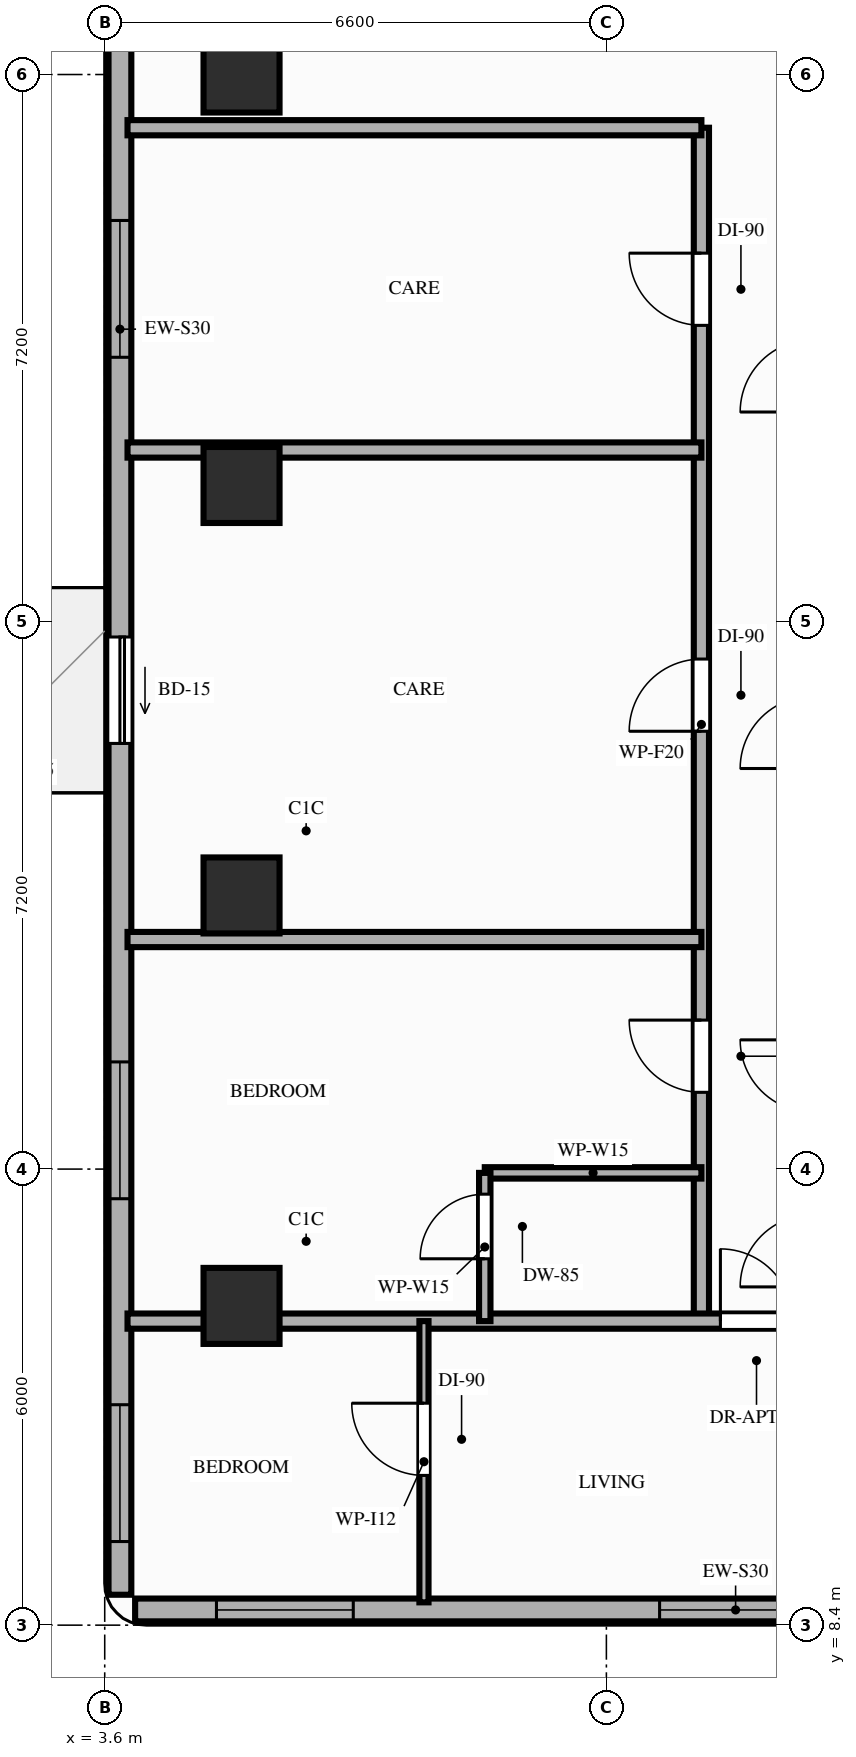
"""IFC4 building model, lengths in metres.
Left out: names, types, materials, properties, quantities, classifications, styles, units other than length and angle.
Written with IfcOpenShell. Run it as: python <this file> out.ifc"""

import sys

from ifc_helpers import new_model, si_unit, direction, frame, frame_2d, origin, origin_2d, place, context, subcontext, project, spatial, rectangle, extrude, element, fill, save


model = new_model("IFC4")
c1 = context("Model", 3, precision=1e-05, world=origin(), true_north=direction((0.0, 1.0)))
c2 = subcontext(c1, "Body", "Model", "MODEL_VIEW")
j1 = project(units=[si_unit("LENGTHUNIT", "METRE"), si_unit("PLANEANGLEUNIT", "RADIAN")], contexts=[c1])
p1 = place(None, origin())
s1 = spatial("IfcSite", under=j1, at=p1, CompositionType="ELEMENT")
p2 = place(p1, origin())
s2 = spatial("IfcBuilding", under=s1, at=p2, CompositionType="ELEMENT")
p3 = place(p2, frame((0.0, 0.0, 133.0)))
s3 = spatial("IfcBuildingStorey", under=s2, at=p3, CompositionType="ELEMENT", Elevation=133.0)
for number, where, z_axis, x_axis in (
    (1, (5.4, 12.6, 0.0), (0.0, 0.0, 1.0), (1.0, 0.0, 0.0)),
    (2, (5.4, 18.0, 0.0), (0.0, 0.0, 1.0), (1.0, 0.0, 0.0)),
    (3, (5.4, 23.4, 0.0), (0.0, 0.0, 1.0), (1.0, 0.0, 0.0)),
    (4, (5.4, 28.8, 0.0), (0.0, 0.0, 1.0), (1.0, 0.0, 0.0)),
):
    element("IfcColumn", number, at=place(p3, frame(where, z_axis=z_axis, x_axis=x_axis)), inside=s3, PredefinedType="COLUMN", context=c2, shape_type="SweptSolid", body=[
        extrude(rectangle(XDim=1.0, YDim=1.0, at=origin_2d()), origin(), (0.0, 0.0, 1.0), 3.2),
    ])
p4 = place(p3, frame((4.0, 8.6, 0.0), z_axis=(0.0, 0.0, 1.0), x_axis=(1.0, 0.0, 0.0)))
e5 = element("IfcWall", 5, at=p4, inside=s3, PredefinedType="STANDARD", context=c2, shape_type="SweptSolid", body=[
    extrude(rectangle(XDim=15.8, YDim=0.3, at=frame_2d((7.9, 0.0))), origin(), (0.0, 0.0, 1.0), 3.02),
])
p5 = place(p4, frame((1.07, 0.0, 0.85)))
e6 = element("IfcOpeningElement", 6, at=p5, cuts=e5, PredefinedType="OPENING", context=c2, shape_type="SweptSolid", body=[
    extrude(rectangle(XDim=1.8, YDim=1.75, at=frame_2d((0.9, 0.875))), frame((0.0, 0.16, 0.0), z_axis=(0.0, -1.0, 0.0), x_axis=(1.0, 0.0, 0.0)), (0.0, 0.0, 1.0), 0.32),
])
p6 = place(p4, frame((6.9, 0.0, 0.85)))
e7 = element("IfcOpeningElement", 7, at=p6, cuts=e5, PredefinedType="OPENING", context=c2, shape_type="SweptSolid", body=[
    extrude(rectangle(XDim=1.8, YDim=1.75, at=frame_2d((0.9, 0.875))), frame((0.0, 0.16, 0.0), z_axis=(0.0, -1.0, 0.0), x_axis=(1.0, 0.0, 0.0)), (0.0, 0.0, 1.0), 0.32),
])
p7 = place(p3, frame((3.8, 42.1, 0.0), z_axis=(0.0, 0.0, 1.0), x_axis=(0.0, -1.0, 0.0)))
e8 = element("IfcWall", 8, at=p7, inside=s3, PredefinedType="STANDARD", context=c2, shape_type="SweptSolid", body=[
    extrude(rectangle(XDim=33.3, YDim=0.3, at=frame_2d((16.65, 0.0))), origin(), (0.0, 0.0, 1.0), 2.71),
])
p8 = place(p7, frame((20.7, 0.0, 0.0)))
e9 = element("IfcOpeningElement", 9, at=p8, cuts=e8, PredefinedType="OPENING", context=c2, shape_type="SweptSolid", body=[
    extrude(rectangle(XDim=1.4, YDim=2.1, at=frame_2d((0.7, 1.05))), frame((0.0, 0.16, 0.0), z_axis=(0.0, -1.0, 0.0), x_axis=(1.0, 0.0, 0.0)), (0.0, 0.0, 1.0), 0.32),
])
p9 = place(p7, frame((26.29, 0.0, 0.85)))
e10 = element("IfcOpeningElement", 10, at=p9, cuts=e8, PredefinedType="OPENING", context=c2, shape_type="SweptSolid", body=[
    extrude(rectangle(XDim=1.8, YDim=1.61, at=frame_2d((0.9, 0.805))), frame((0.0, 0.16, 0.0), z_axis=(0.0, -1.0, 0.0), x_axis=(1.0, 0.0, 0.0)), (0.0, 0.0, 1.0), 0.32),
])
p10 = place(p7, frame((15.22, 0.0, 0.85)))
e11 = element("IfcOpeningElement", 11, at=p10, cuts=e8, PredefinedType="OPENING", context=c2, shape_type="SweptSolid", body=[
    extrude(rectangle(XDim=1.8, YDim=1.61, at=frame_2d((0.9, 0.805))), frame((0.0, 0.16, 0.0), z_axis=(0.0, -1.0, 0.0), x_axis=(1.0, 0.0, 0.0)), (0.0, 0.0, 1.0), 0.32),
])
p11 = place(p7, frame((30.8, 0.0, 0.85)))
e12 = element("IfcOpeningElement", 12, at=p11, cuts=e8, PredefinedType="OPENING", context=c2, shape_type="SweptSolid", body=[
    extrude(rectangle(XDim=1.8, YDim=1.61, at=frame_2d((0.9, 0.805))), frame((0.0, 0.16, 0.0), z_axis=(0.0, -1.0, 0.0), x_axis=(1.0, 0.0, 0.0)), (0.0, 0.0, 1.0), 0.32),
])
p12 = place(p7, frame((9.9, 0.0, 0.85)))
e13 = element("IfcOpeningElement", 13, at=p12, cuts=e8, PredefinedType="OPENING", context=c2, shape_type="SweptSolid", body=[
    extrude(rectangle(XDim=1.8, YDim=1.61, at=frame_2d((0.9, 0.805))), frame((0.0, 0.16, 0.0), z_axis=(0.0, -1.0, 0.0), x_axis=(1.0, 0.0, 0.0)), (0.0, 0.0, 1.0), 0.32),
])
p13 = place(p7, frame((3.8, 0.0, 0.85)))
e14 = element("IfcOpeningElement", 14, at=p13, cuts=e8, PredefinedType="OPENING", context=c2, shape_type="SweptSolid", body=[
    extrude(rectangle(XDim=1.8, YDim=1.61, at=frame_2d((0.9, 0.805))), frame((0.0, 0.16, 0.0), z_axis=(0.0, -1.0, 0.0), x_axis=(1.0, 0.0, 0.0)), (0.0, 0.0, 1.0), 0.32),
])
p14 = place(p3, frame((11.45, 12.4, 0.0), z_axis=(0.0, 0.0, 1.0), x_axis=(0.0, 1.0, 0.0)))
e15 = element("IfcWall", 15, at=p14, inside=s3, PredefinedType="PARTITIONING", context=c2, shape_type="SweptSolid", body=[
    extrude(rectangle(XDim=15.7, YDim=0.2, at=frame_2d((7.85, 0.0))), origin(), (0.0, 0.0, 1.0), 2.46),
])
p15 = place(p14, frame((3.01, 0.0, 0.0)))
e16 = element("IfcOpeningElement", 16, at=p15, cuts=e15, PredefinedType="OPENING", context=c2, shape_type="SweptSolid", body=[
    extrude(rectangle(XDim=0.95, YDim=2.15, at=frame_2d((0.475, 1.075))), frame((0.0, 0.11, 0.0), z_axis=(0.0, -1.0, 0.0), x_axis=(1.0, 0.0, 0.0)), (0.0, 0.0, 1.0), 0.22),
])
p16 = place(p14, frame((7.76, 0.0, 0.0)))
e17 = element("IfcOpeningElement", 17, at=p16, cuts=e15, PredefinedType="OPENING", context=c2, shape_type="SweptSolid", body=[
    extrude(rectangle(XDim=0.95, YDim=2.15, at=frame_2d((0.475, 1.075))), frame((0.0, 0.11, 0.0), z_axis=(0.0, -1.0, 0.0), x_axis=(1.0, 0.0, 0.0)), (0.0, 0.0, 1.0), 0.22),
])
p17 = place(p14, frame((13.1, 0.0, 0.0)))
e18 = element("IfcOpeningElement", 18, at=p17, cuts=e15, PredefinedType="OPENING", context=c2, shape_type="SweptSolid", body=[
    extrude(rectangle(XDim=0.95, YDim=2.15, at=frame_2d((0.475, 1.075))), frame((0.0, 0.11, 0.0), z_axis=(0.0, -1.0, 0.0), x_axis=(1.0, 0.0, 0.0)), (0.0, 0.0, 1.0), 0.22),
])
p18 = place(p3, frame((3.9, 12.4, 0.0), z_axis=(0.0, 0.0, 1.0), x_axis=(1.0, 0.0, 0.0)))
e19 = element("IfcWall", 19, at=p18, inside=s3, PredefinedType="PARTITIONING", context=c2, shape_type="SweptSolid", body=[
    extrude(rectangle(XDim=16.0, YDim=0.2, at=frame_2d((8.0, 0.0))), origin(), (0.0, 0.0, 1.0), 2.46),
])
p19 = place(p18, frame((7.8, 0.0, 0.0)))
e20 = element("IfcOpeningElement", 20, at=p19, cuts=e19, PredefinedType="OPENING", context=c2, shape_type="SweptSolid", body=[
    extrude(rectangle(XDim=0.95, YDim=2.15, at=frame_2d((0.475, 1.075))), frame((0.0, 0.11, 0.0), z_axis=(0.0, -1.0, 0.0), x_axis=(1.0, 0.0, 0.0)), (0.0, 0.0, 1.0), 0.22),
])
p20 = place(p3, frame((3.9, 28.1, 0.0), z_axis=(0.0, 0.0, 1.0), x_axis=(1.0, 0.0, 0.0)))
e21 = element("IfcWall", 21, at=p20, inside=s3, PredefinedType="PARTITIONING", context=c2, shape_type="SweptSolid", body=[
    extrude(rectangle(XDim=7.55, YDim=0.2, at=frame_2d((3.775, 0.0))), origin(), (0.0, 0.0, 1.0), 2.46),
])
p21 = place(p3, frame((8.6, 14.35, 0.0), z_axis=(0.0, 0.0, 1.0), x_axis=(1.0, 0.0, 0.0)))
e22 = element("IfcWall", 22, at=p21, inside=s3, PredefinedType="PARTITIONING", context=c2, shape_type="SweptSolid", body=[
    extrude(rectangle(XDim=2.85, YDim=0.15, at=frame_2d((1.425, 0.0))), origin(), (0.0, 0.0, 1.0), 2.71),
])
p22 = place(p3, frame((8.6, 12.4, 0.0), z_axis=(0.0, 0.0, 1.0), x_axis=(0.0, 1.0, 0.0)))
e23 = element("IfcWall", 23, at=p22, inside=s3, PredefinedType="PARTITIONING", context=c2, shape_type="SweptSolid", body=[
    extrude(rectangle(XDim=1.95, YDim=0.15, at=frame_2d((0.975, 0.0))), origin(), (0.0, 0.0, 1.0), 2.46),
])
p23 = place(p22, frame((0.82, 0.0, 0.0)))
e24 = element("IfcOpeningElement", 24, at=p23, cuts=e23, PredefinedType="OPENING", context=c2, shape_type="SweptSolid", body=[
    extrude(rectangle(XDim=0.85, YDim=2.1, at=frame_2d((0.425, 1.05))), frame((0.0, 0.085, 0.0), z_axis=(0.0, -1.0, 0.0), x_axis=(1.0, 0.0, 0.0)), (0.0, 0.0, 1.0), 0.17),
])
for number, where, z_axis, x_axis in (
    (25, (3.9, 17.42, 0.0), (0.0, 0.0, 1.0), (1.0, 0.0, 0.0)),
    (26, (3.9, 23.86, 0.0), (0.0, 0.0, 1.0), (1.0, 0.0, 0.0)),
):
    element("IfcWall", number, at=place(p3, frame(where, z_axis=z_axis, x_axis=x_axis)), inside=s3, PredefinedType="PARTITIONING", context=c2, shape_type="SweptSolid", body=[
        extrude(rectangle(XDim=7.55, YDim=0.2, at=frame_2d((3.775, 0.0))), origin(), (0.0, 0.0, 1.0), 2.46),
    ])
p24 = place(p3, frame((7.8, 8.7, 0.0), z_axis=(0.0, 0.0, 1.0), x_axis=(0.0, 1.0, 0.0)))
e27 = element("IfcWall", 27, at=p24, inside=s3, PredefinedType="PARTITIONING", context=c2, shape_type="SweptSolid", body=[
    extrude(rectangle(XDim=3.7, YDim=0.12, at=frame_2d((1.85, 0.0))), origin(), (0.0, 0.0, 1.0), 2.46),
])
p25 = place(p24, frame((1.67, 0.0, 0.0)))
e28 = element("IfcOpeningElement", 28, at=p25, cuts=e27, PredefinedType="OPENING", context=c2, shape_type="SweptSolid", body=[
    extrude(rectangle(XDim=0.95, YDim=2.15, at=frame_2d((0.475, 1.075))), frame((0.0, 0.07, 0.0), z_axis=(0.0, -1.0, 0.0), x_axis=(1.0, 0.0, 0.0)), (0.0, 0.0, 1.0), 0.14),
])
p26 = place(p8, origin())
e29 = element("IfcDoor", 29, at=p26, inside=s3, OperationType="SLIDING_TO_RIGHT", PredefinedType="DOOR", context=c2, shape_type="SweptSolid", body=[
    extrude(rectangle(XDim=1.4, YDim=2.1, at=frame_2d((0.7, 1.05))), frame((0.0, 0.025, 0.0), z_axis=(0.0, -1.0, 0.0), x_axis=(1.0, 0.0, 0.0)), (0.0, 0.0, 1.0), 0.05),
])
fill(e9, e29)
p27 = place(p9, origin())
e30 = element("IfcWindow", 30, at=p27, inside=s3, PartitioningType="SINGLE_PANEL", PredefinedType="WINDOW", context=c2, shape_type="SweptSolid", body=[
    extrude(rectangle(XDim=1.8, YDim=1.61, at=frame_2d((0.9, 0.805))), frame((0.0, 0.03, 0.0), z_axis=(0.0, -1.0, 0.0), x_axis=(1.0, 0.0, 0.0)), (0.0, 0.0, 1.0), 0.06),
])
fill(e10, e30)
p28 = place(p10, origin())
e31 = element("IfcWindow", 31, at=p28, inside=s3, PartitioningType="SINGLE_PANEL", PredefinedType="WINDOW", context=c2, shape_type="SweptSolid", body=[
    extrude(rectangle(XDim=1.8, YDim=1.61, at=frame_2d((0.9, 0.805))), frame((0.0, 0.03, 0.0), z_axis=(0.0, -1.0, 0.0), x_axis=(1.0, 0.0, 0.0)), (0.0, 0.0, 1.0), 0.06),
])
fill(e11, e31)
p29 = place(p5, origin())
e32 = element("IfcWindow", 32, at=p29, inside=s3, PartitioningType="SINGLE_PANEL", PredefinedType="WINDOW", context=c2, shape_type="SweptSolid", body=[
    extrude(rectangle(XDim=1.8, YDim=1.75, at=frame_2d((0.9, 0.875))), frame((0.0, 0.03, 0.0), z_axis=(0.0, -1.0, 0.0), x_axis=(1.0, 0.0, 0.0)), (0.0, 0.0, 1.0), 0.06),
])
fill(e6, e32)
p30 = place(p6, origin())
e33 = element("IfcWindow", 33, at=p30, inside=s3, PartitioningType="SINGLE_PANEL", PredefinedType="WINDOW", context=c2, shape_type="SweptSolid", body=[
    extrude(rectangle(XDim=1.8, YDim=1.75, at=frame_2d((0.9, 0.875))), frame((0.0, 0.03, 0.0), z_axis=(0.0, -1.0, 0.0), x_axis=(1.0, 0.0, 0.0)), (0.0, 0.0, 1.0), 0.06),
])
fill(e7, e33)
p31 = place(p11, origin())
e34 = element("IfcWindow", 34, at=p31, inside=s3, PartitioningType="SINGLE_PANEL", PredefinedType="WINDOW", context=c2, shape_type="SweptSolid", body=[
    extrude(rectangle(XDim=1.8, YDim=1.61, at=frame_2d((0.9, 0.805))), frame((0.0, 0.03, 0.0), z_axis=(0.0, -1.0, 0.0), x_axis=(1.0, 0.0, 0.0)), (0.0, 0.0, 1.0), 0.06),
])
fill(e12, e34)
p32 = place(p23, origin())
e35 = element("IfcDoor", 35, at=p32, inside=s3, OperationType="SINGLE_SWING_LEFT", PredefinedType="DOOR", context=c2, shape_type="SweptSolid", body=[
    extrude(rectangle(XDim=0.85, YDim=2.1, at=frame_2d((0.425, 1.05))), frame((0.0, 0.025, 0.0), z_axis=(0.0, -1.0, 0.0), x_axis=(1.0, 0.0, 0.0)), (0.0, 0.0, 1.0), 0.05),
])
fill(e24, e35)
p33 = place(p15, origin())
e36 = element("IfcDoor", 36, at=p33, inside=s3, OperationType="SINGLE_SWING_RIGHT", PredefinedType="DOOR", context=c2, shape_type="SweptSolid", body=[
    extrude(rectangle(XDim=0.95, YDim=2.15, at=frame_2d((0.475, 1.075))), frame((0.0, 0.025, 0.0), z_axis=(0.0, -1.0, 0.0), x_axis=(1.0, 0.0, 0.0)), (0.0, 0.0, 1.0), 0.05),
])
fill(e16, e36)
p34 = place(p16, origin())
e37 = element("IfcDoor", 37, at=p34, inside=s3, OperationType="SINGLE_SWING_LEFT", PredefinedType="DOOR", context=c2, shape_type="SweptSolid", body=[
    extrude(rectangle(XDim=0.95, YDim=2.15, at=frame_2d((0.475, 1.075))), frame((0.0, 0.025, 0.0), z_axis=(0.0, -1.0, 0.0), x_axis=(1.0, 0.0, 0.0)), (0.0, 0.0, 1.0), 0.05),
])
fill(e17, e37)
p35 = place(p17, origin())
e38 = element("IfcDoor", 38, at=p35, inside=s3, OperationType="SINGLE_SWING_RIGHT", PredefinedType="DOOR", context=c2, shape_type="SweptSolid", body=[
    extrude(rectangle(XDim=0.95, YDim=2.15, at=frame_2d((0.475, 1.075))), frame((0.0, 0.025, 0.0), z_axis=(0.0, -1.0, 0.0), x_axis=(1.0, 0.0, 0.0)), (0.0, 0.0, 1.0), 0.05),
])
fill(e18, e38)
p36 = place(p19, origin())
e39 = element("IfcDoor", 39, at=p36, inside=s3, OperationType="SINGLE_SWING_LEFT", PredefinedType="DOOR", context=c2, shape_type="SweptSolid", body=[
    extrude(rectangle(XDim=0.95, YDim=2.15, at=frame_2d((0.475, 1.075))), frame((0.0, 0.025, 0.0), z_axis=(0.0, -1.0, 0.0), x_axis=(1.0, 0.0, 0.0)), (0.0, 0.0, 1.0), 0.05),
])
fill(e20, e39)
p37 = place(p25, origin())
e40 = element("IfcDoor", 40, at=p37, inside=s3, OperationType="SINGLE_SWING_RIGHT", PredefinedType="DOOR", context=c2, shape_type="SweptSolid", body=[
    extrude(rectangle(XDim=0.95, YDim=2.15, at=frame_2d((0.475, 1.075))), frame((0.0, 0.025, 0.0), z_axis=(0.0, -1.0, 0.0), x_axis=(1.0, 0.0, 0.0)), (0.0, 0.0, 1.0), 0.05),
])
fill(e28, e40)
save(model, sys.argv[1])
